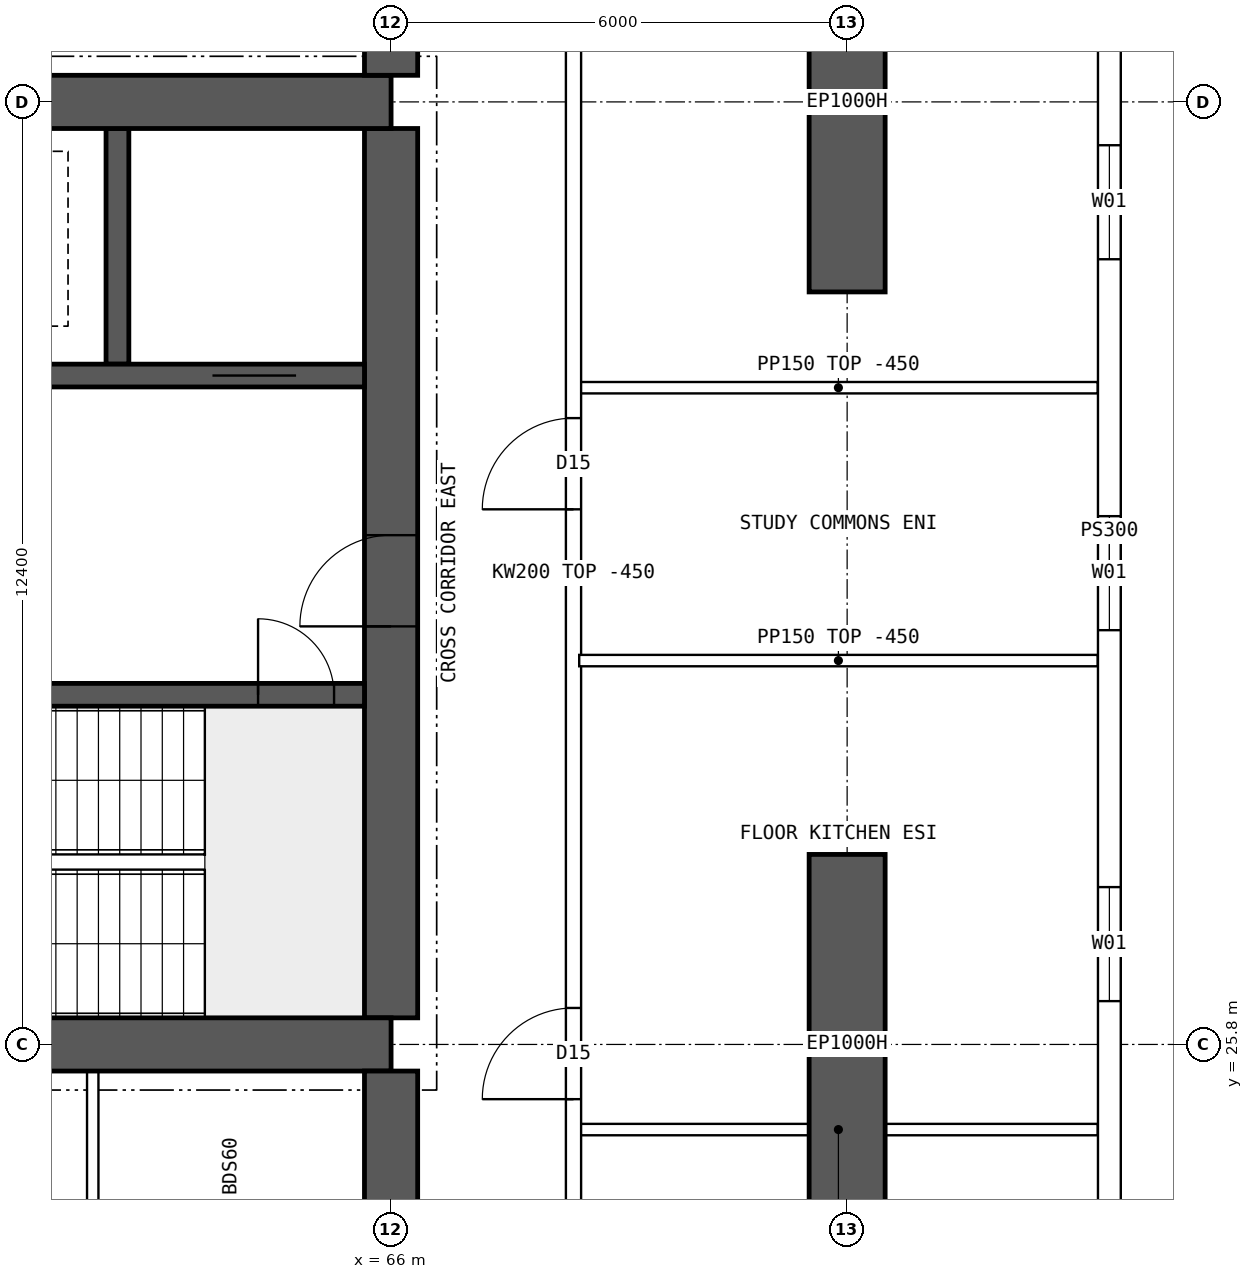
"""IFC4 building model, lengths in metres.
Left out: names, types, materials, properties, quantities, classifications, styles, units other than length and angle.
Written with IfcOpenShell. Run it as: python <this file> out.ifc"""

import sys

from ifc_helpers import new_model, si_unit, direction, frame, frame_2d, origin, place, context, subcontext, project, spatial, polyline, rectangle, outline, extrude, element, fill, save


model = new_model("IFC4")
c1 = context("Model", 3, precision=1e-05, world=origin(), true_north=direction((0.0, 1.0)))
c2 = subcontext(c1, "Body", "Model", "MODEL_VIEW")
j1 = project(units=[si_unit("LENGTHUNIT", "METRE"), si_unit("PLANEANGLEUNIT", "RADIAN")], contexts=[c1])
p1 = place(None, origin())
s1 = spatial("IfcSite", under=j1, at=p1, CompositionType="ELEMENT")
p2 = place(p1, origin())
s2 = spatial("IfcBuilding", under=s1, at=p2, CompositionType="ELEMENT")
p3 = place(p2, frame((0.0, 0.0, 227.8)))
s3 = spatial("IfcBuildingStorey", under=s2, at=p3, CompositionType="ELEMENT", Elevation=227.8)
for number, where, z_axis, x_axis in (
    (1, (72.0, 23.3, 0.0), (0.0, 0.0, 1.0), (0.0, 1.0, 0.0)),
    (2, (72.0, 35.7, 0.0), (0.0, 0.0, 1.0), (0.0, 1.0, 0.0)),
):
    element("IfcWall", number, at=place(p3, frame(where, z_axis=z_axis, x_axis=x_axis)), inside=s3, PredefinedType="SHEAR", context=c2, shape_type="SweptSolid", body=[
        extrude(rectangle(XDim=5.0, YDim=1.0, at=frame_2d((2.5, 0.0))), origin(), (0.0, 0.0, 1.0), 3.75),
    ])
for number, where, z_axis, x_axis in (
    (3, (18.0, 25.8, 0.0), (0.0, 0.0, 1.0), (1.0, 0.0, 0.0)),
    (4, (18.0, 38.2, 0.0), (0.0, 0.0, 1.0), (1.0, 0.0, 0.0)),
):
    element("IfcWall", number, at=place(p3, frame(where, z_axis=z_axis, x_axis=x_axis)), inside=s3, PredefinedType="SHEAR", context=c2, shape_type="SweptSolid", body=[
        extrude(rectangle(XDim=48.0, YDim=0.7, at=frame_2d((24.0, 0.0))), origin(), (0.0, 0.0, 1.0), 3.75),
    ])
p4 = place(p3, frame((66.0, 26.15, 0.0), z_axis=(0.0, 0.0, 1.0), x_axis=(0.0, 1.0, 0.0)))
e5 = element("IfcWall", 5, at=p4, inside=s3, PredefinedType="SHEAR", context=c2, shape_type="SweptSolid", body=[
    extrude(rectangle(XDim=11.7, YDim=0.7, at=frame_2d((5.85, 0.0))), origin(), (0.0, 0.0, 1.0), 3.75),
])
p5 = place(p4, frame((5.15, 0.0, 0.0)))
e6 = element("IfcOpeningElement", 6, at=p5, cuts=e5, PredefinedType="OPENING", context=c2, shape_type="SweptSolid", body=[
    extrude(rectangle(XDim=1.2, YDim=2.1, at=frame_2d((0.6, 1.05))), frame((0.0, 0.36, 0.0), z_axis=(0.0, -1.0, 0.0), x_axis=(1.0, 0.0, 0.0)), (0.0, 0.0, 1.0), 0.72),
])
p6 = place(p3, frame((18.35, 30.4, 0.0), z_axis=(0.0, 0.0, 1.0), x_axis=(1.0, 0.0, 0.0)))
e7 = element("IfcWall", 7, at=p6, inside=s3, PredefinedType="SHEAR", context=c2, shape_type="SweptSolid", body=[
    extrude(rectangle(XDim=47.3, YDim=0.3, at=frame_2d((23.65, 0.0))), origin(), (0.0, 0.0, 1.0), 3.75),
])
p7 = place(p6, frame((0.4, 0.0, 0.0)))
e8 = element("IfcOpeningElement", 8, at=p7, cuts=e7, PredefinedType="OPENING", context=c2, shape_type="SweptSolid", body=[
    extrude(rectangle(XDim=1.0, YDim=2.1, at=frame_2d((0.5, 1.05))), frame((0.0, 0.16, 0.0), z_axis=(0.0, -1.0, 0.0), x_axis=(1.0, 0.0, 0.0)), (0.0, 0.0, 1.0), 0.32),
])
p8 = place(p6, frame((45.9, 0.0, 0.0)))
e9 = element("IfcOpeningElement", 9, at=p8, cuts=e7, PredefinedType="OPENING", context=c2, shape_type="SweptSolid", body=[
    extrude(rectangle(XDim=1.0, YDim=2.1, at=frame_2d((0.5, 1.05))), frame((0.0, 0.16, 0.0), z_axis=(0.0, -1.0, 0.0), x_axis=(1.0, 0.0, 0.0)), (0.0, 0.0, 1.0), 0.32),
])
p9 = place(p6, frame((8.4, 0.0, 0.0)))
e10 = element("IfcOpeningElement", 10, at=p9, cuts=e7, PredefinedType="OPENING", context=c2, shape_type="SweptSolid", body=[
    extrude(rectangle(XDim=1.1, YDim=2.1, at=frame_2d((0.55, 1.05))), frame((0.0, 0.16, 0.0), z_axis=(0.0, -1.0, 0.0), x_axis=(1.0, 0.0, 0.0)), (0.0, 0.0, 1.0), 0.32),
])
p10 = place(p6, frame((11.0, 0.0, 0.0)))
e11 = element("IfcOpeningElement", 11, at=p10, cuts=e7, PredefinedType="OPENING", context=c2, shape_type="SweptSolid", body=[
    extrude(rectangle(XDim=1.1, YDim=2.1, at=frame_2d((0.55, 1.05))), frame((0.0, 0.16, 0.0), z_axis=(0.0, -1.0, 0.0), x_axis=(1.0, 0.0, 0.0)), (0.0, 0.0, 1.0), 0.32),
])
p11 = place(p6, frame((13.6, 0.0, 0.0)))
e12 = element("IfcOpeningElement", 12, at=p11, cuts=e7, PredefinedType="OPENING", context=c2, shape_type="SweptSolid", body=[
    extrude(rectangle(XDim=1.1, YDim=2.1, at=frame_2d((0.55, 1.05))), frame((0.0, 0.16, 0.0), z_axis=(0.0, -1.0, 0.0), x_axis=(1.0, 0.0, 0.0)), (0.0, 0.0, 1.0), 0.32),
])
p12 = place(p6, frame((16.2, 0.0, 0.0)))
e13 = element("IfcOpeningElement", 13, at=p12, cuts=e7, PredefinedType="OPENING", context=c2, shape_type="SweptSolid", body=[
    extrude(rectangle(XDim=1.1, YDim=2.1, at=frame_2d((0.55, 1.05))), frame((0.0, 0.16, 0.0), z_axis=(0.0, -1.0, 0.0), x_axis=(1.0, 0.0, 0.0)), (0.0, 0.0, 1.0), 0.32),
])
p13 = place(p6, frame((18.975, 0.0, 0.0)))
e14 = element("IfcOpeningElement", 14, at=p13, cuts=e7, PredefinedType="OPENING", context=c2, shape_type="SweptSolid", body=[
    extrude(rectangle(XDim=0.9, YDim=2.1, at=frame_2d((0.45, 1.05))), frame((0.0, 0.16, 0.0), z_axis=(0.0, -1.0, 0.0), x_axis=(1.0, 0.0, 0.0)), (0.0, 0.0, 1.0), 0.32),
])
p14 = place(p6, frame((24.475, 0.0, 0.0)))
e15 = element("IfcOpeningElement", 15, at=p14, cuts=e7, PredefinedType="OPENING", context=c2, shape_type="SweptSolid", body=[
    extrude(rectangle(XDim=0.9, YDim=2.1, at=frame_2d((0.45, 1.05))), frame((0.0, 0.16, 0.0), z_axis=(0.0, -1.0, 0.0), x_axis=(1.0, 0.0, 0.0)), (0.0, 0.0, 1.0), 0.32),
])
p15 = place(p6, frame((30.267, 0.0, 0.0)))
e16 = element("IfcOpeningElement", 16, at=p15, cuts=e7, PredefinedType="OPENING", context=c2, shape_type="SweptSolid", body=[
    extrude(rectangle(XDim=1.1, YDim=2.1, at=frame_2d((0.55, 1.05))), frame((0.0, 0.16, 0.0), z_axis=(0.0, -1.0, 0.0), x_axis=(1.0, 0.0, 0.0)), (0.0, 0.0, 1.0), 0.32),
])
p16 = place(p6, frame((33.8, 0.0, 0.0)))
e17 = element("IfcOpeningElement", 17, at=p16, cuts=e7, PredefinedType="OPENING", context=c2, shape_type="SweptSolid", body=[
    extrude(rectangle(XDim=1.1, YDim=2.1, at=frame_2d((0.55, 1.05))), frame((0.0, 0.16, 0.0), z_axis=(0.0, -1.0, 0.0), x_axis=(1.0, 0.0, 0.0)), (0.0, 0.0, 1.0), 0.32),
])
p17 = place(p6, frame((37.333, 0.0, 0.0)))
e18 = element("IfcOpeningElement", 18, at=p17, cuts=e7, PredefinedType="OPENING", context=c2, shape_type="SweptSolid", body=[
    extrude(rectangle(XDim=1.1, YDim=2.1, at=frame_2d((0.55, 1.05))), frame((0.0, 0.16, 0.0), z_axis=(0.0, -1.0, 0.0), x_axis=(1.0, 0.0, 0.0)), (0.0, 0.0, 1.0), 0.32),
])
p18 = place(p3, frame((18.35, 34.6, 0.0), z_axis=(0.0, 0.0, 1.0), x_axis=(1.0, 0.0, 0.0)))
e19 = element("IfcWall", 19, at=p18, inside=s3, PredefinedType="SHEAR", context=c2, shape_type="SweptSolid", body=[
    extrude(rectangle(XDim=47.3, YDim=0.3, at=frame_2d((23.65, 0.0))), origin(), (0.0, 0.0, 1.0), 3.75),
])
p19 = place(p18, frame((0.9, 0.0, 0.0)))
e20 = element("IfcOpeningElement", 20, at=p19, cuts=e19, PredefinedType="OPENING", context=c2, shape_type="SweptSolid", body=[
    extrude(rectangle(XDim=1.1, YDim=2.1, at=frame_2d((0.55, 1.05))), frame((0.0, 0.16, 0.0), z_axis=(0.0, -1.0, 0.0), x_axis=(1.0, 0.0, 0.0)), (0.0, 0.0, 1.0), 0.32),
])
p20 = place(p18, frame((45.3, 0.0, 0.0)))
e21 = element("IfcOpeningElement", 21, at=p20, cuts=e19, PredefinedType="OPENING", context=c2, shape_type="SweptSolid", body=[
    extrude(rectangle(XDim=1.1, YDim=2.1, at=frame_2d((0.55, 1.05))), frame((0.0, 0.16, 0.0), z_axis=(0.0, -1.0, 0.0), x_axis=(1.0, 0.0, 0.0)), (0.0, 0.0, 1.0), 0.32),
])
p21 = place(p18, frame((4.25, 0.0, 0.0)))
e22 = element("IfcOpeningElement", 22, at=p21, cuts=e19, PredefinedType="OPENING", context=c2, shape_type="SweptSolid", body=[
    extrude(rectangle(XDim=0.9, YDim=2.1, at=frame_2d((0.45, 1.05))), frame((0.0, 0.16, 0.0), z_axis=(0.0, -1.0, 0.0), x_axis=(1.0, 0.0, 0.0)), (0.0, 0.0, 1.0), 0.32),
])
p22 = place(p18, frame((42.15, 0.0, 0.0)))
e23 = element("IfcOpeningElement", 23, at=p22, cuts=e19, PredefinedType="OPENING", context=c2, shape_type="SweptSolid", body=[
    extrude(rectangle(XDim=0.9, YDim=2.1, at=frame_2d((0.45, 1.05))), frame((0.0, 0.16, 0.0), z_axis=(0.0, -1.0, 0.0), x_axis=(1.0, 0.0, 0.0)), (0.0, 0.0, 1.0), 0.32),
])
p23 = place(p18, frame((9.025, 0.0, 0.0)))
e24 = element("IfcOpeningElement", 24, at=p23, cuts=e19, PredefinedType="OPENING", context=c2, shape_type="SweptSolid", body=[
    extrude(rectangle(XDim=0.9, YDim=2.1, at=frame_2d((0.45, 1.05))), frame((0.0, 0.16, 0.0), z_axis=(0.0, -1.0, 0.0), x_axis=(1.0, 0.0, 0.0)), (0.0, 0.0, 1.0), 0.32),
])
p24 = place(p18, frame((12.999, 0.0, 0.0)))
e25 = element("IfcOpeningElement", 25, at=p24, cuts=e19, PredefinedType="OPENING", context=c2, shape_type="SweptSolid", body=[
    extrude(rectangle(XDim=0.9, YDim=2.1, at=frame_2d((0.45, 1.05))), frame((0.0, 0.16, 0.0), z_axis=(0.0, -1.0, 0.0), x_axis=(1.0, 0.0, 0.0)), (0.0, 0.0, 1.0), 0.32),
])
p25 = place(p18, frame((16.646, 0.0, 0.0)))
e26 = element("IfcOpeningElement", 26, at=p25, cuts=e19, PredefinedType="OPENING", context=c2, shape_type="SweptSolid", body=[
    extrude(rectangle(XDim=0.9, YDim=2.1, at=frame_2d((0.45, 1.05))), frame((0.0, 0.16, 0.0), z_axis=(0.0, -1.0, 0.0), x_axis=(1.0, 0.0, 0.0)), (0.0, 0.0, 1.0), 0.32),
])
p26 = place(p18, frame((20.405, 0.0, 0.0)))
e27 = element("IfcOpeningElement", 27, at=p26, cuts=e19, PredefinedType="OPENING", context=c2, shape_type="SweptSolid", body=[
    extrude(rectangle(XDim=0.9, YDim=2.1, at=frame_2d((0.45, 1.05))), frame((0.0, 0.16, 0.0), z_axis=(0.0, -1.0, 0.0), x_axis=(1.0, 0.0, 0.0)), (0.0, 0.0, 1.0), 0.32),
])
p27 = place(p18, frame((24.811, 0.0, 0.0)))
e28 = element("IfcOpeningElement", 28, at=p27, cuts=e19, PredefinedType="OPENING", context=c2, shape_type="SweptSolid", body=[
    extrude(rectangle(XDim=0.9, YDim=2.1, at=frame_2d((0.45, 1.05))), frame((0.0, 0.16, 0.0), z_axis=(0.0, -1.0, 0.0), x_axis=(1.0, 0.0, 0.0)), (0.0, 0.0, 1.0), 0.32),
])
p28 = place(p18, frame((27.608, 0.0, 0.0)))
e29 = element("IfcOpeningElement", 29, at=p28, cuts=e19, PredefinedType="OPENING", context=c2, shape_type="SweptSolid", body=[
    extrude(rectangle(XDim=0.9, YDim=2.1, at=frame_2d((0.45, 1.05))), frame((0.0, 0.16, 0.0), z_axis=(0.0, -1.0, 0.0), x_axis=(1.0, 0.0, 0.0)), (0.0, 0.0, 1.0), 0.32),
])
p29 = place(p18, frame((33.729, 0.0, 0.0)))
e30 = element("IfcOpeningElement", 30, at=p29, cuts=e19, PredefinedType="OPENING", context=c2, shape_type="SweptSolid", body=[
    extrude(rectangle(XDim=0.9, YDim=2.1, at=frame_2d((0.45, 1.05))), frame((0.0, 0.16, 0.0), z_axis=(0.0, -1.0, 0.0), x_axis=(1.0, 0.0, 0.0)), (0.0, 0.0, 1.0), 0.32),
])
p30 = place(p3, frame((62.4, 34.75, 0.0), z_axis=(0.0, 0.0, 1.0), x_axis=(0.0, 1.0, 0.0)))
e31 = element("IfcWall", 31, at=p30, inside=s3, PredefinedType="SHEAR", context=c2, shape_type="SweptSolid", body=[
    extrude(rectangle(XDim=3.1, YDim=0.3, at=frame_2d((1.55, 0.0))), origin(), (0.0, 0.0, 1.0), 3.75),
])
for number, where, z_axis, x_axis in (
    (32, (66.0, 18.4, 0.0), (0.0, 0.0, 1.0), (0.0, 1.0, 0.0)),
    (33, (66.0, 38.55, 0.0), (0.0, 0.0, 1.0), (0.0, 1.0, 0.0)),
):
    element("IfcWall", number, at=place(p3, frame(where, z_axis=z_axis, x_axis=x_axis)), inside=s3, PredefinedType="SHEAR", context=c2, shape_type="SweptSolid", body=[
        extrude(rectangle(XDim=7.05, YDim=0.7, at=frame_2d((3.525, 0.0))), origin(), (0.0, 0.0, 1.0), 3.75),
    ])
p31 = place(p3, frame((75.45, 19.8, 0.0), z_axis=(0.0, 0.0, 1.0), x_axis=(0.0, 1.0, 0.0)))
e34 = element("IfcWall", 34, at=p31, inside=s3, PredefinedType="SOLIDWALL", context=c2, shape_type="SweptSolid", body=[
    extrude(outline(polyline([(-0.015, -0.15), (24.415, -0.15), (24.385, 0.15), (0.015, 0.15), (-0.015, -0.15)])), origin(), (0.0, 0.0, 1.0), 3.3),
])
p32 = place(p31, frame((1.69, 0.0, 0.9)))
e35 = element("IfcOpeningElement", 35, at=p32, cuts=e34, PredefinedType="OPENING", context=c2, shape_type="SweptSolid", body=[
    extrude(rectangle(XDim=1.5, YDim=2.0, at=frame_2d((0.75, 1.0))), frame((0.0, 0.16, 0.0), z_axis=(0.0, -1.0, 0.0), x_axis=(1.0, 0.0, 0.0)), (0.0, 0.0, 1.0), 0.32),
])
p33 = place(p31, frame((6.57, 0.0, 0.9)))
e36 = element("IfcOpeningElement", 36, at=p33, cuts=e34, PredefinedType="OPENING", context=c2, shape_type="SweptSolid", body=[
    extrude(rectangle(XDim=1.5, YDim=2.0, at=frame_2d((0.75, 1.0))), frame((0.0, 0.16, 0.0), z_axis=(0.0, -1.0, 0.0), x_axis=(1.0, 0.0, 0.0)), (0.0, 0.0, 1.0), 0.32),
])
p34 = place(p31, frame((11.45, 0.0, 0.9)))
e37 = element("IfcOpeningElement", 37, at=p34, cuts=e34, PredefinedType="OPENING", context=c2, shape_type="SweptSolid", body=[
    extrude(rectangle(XDim=1.5, YDim=2.0, at=frame_2d((0.75, 1.0))), frame((0.0, 0.16, 0.0), z_axis=(0.0, -1.0, 0.0), x_axis=(1.0, 0.0, 0.0)), (0.0, 0.0, 1.0), 0.32),
])
p35 = place(p31, frame((16.33, 0.0, 0.9)))
e38 = element("IfcOpeningElement", 38, at=p35, cuts=e34, PredefinedType="OPENING", context=c2, shape_type="SweptSolid", body=[
    extrude(rectangle(XDim=1.5, YDim=2.0, at=frame_2d((0.75, 1.0))), frame((0.0, 0.16, 0.0), z_axis=(0.0, -1.0, 0.0), x_axis=(1.0, 0.0, 0.0)), (0.0, 0.0, 1.0), 0.32),
])
p36 = place(p31, frame((21.21, 0.0, 0.9)))
e39 = element("IfcOpeningElement", 39, at=p36, cuts=e34, PredefinedType="OPENING", context=c2, shape_type="SweptSolid", body=[
    extrude(rectangle(XDim=1.5, YDim=2.0, at=frame_2d((0.75, 1.0))), frame((0.0, 0.16, 0.0), z_axis=(0.0, -1.0, 0.0), x_axis=(1.0, 0.0, 0.0)), (0.0, 0.0, 1.0), 0.32),
])
p37 = place(p3, frame((62.075, 18.5, 0.0), z_axis=(0.0, 0.0, 1.0), x_axis=(0.0, 1.0, 0.0)))
e40 = element("IfcWall", 40, at=p37, inside=s3, PredefinedType="PARTITIONING", context=c2, shape_type="SweptSolid", body=[
    extrude(rectangle(XDim=6.95, YDim=0.15, at=frame_2d((3.475, 0.0))), origin(), (0.0, 0.0, 1.0), 3.3),
])
p38 = place(p3, frame((68.475, 30.85, 0.0), z_axis=(0.0, 0.0, 1.0), x_axis=(1.0, 0.0, 0.0)))
e41 = element("IfcWall", 41, at=p38, inside=s3, PredefinedType="PARTITIONING", context=c2, shape_type="SweptSolid", body=[
    extrude(outline(polyline([(0.0, 0.0), (6.82, 0.0), (6.82, 3.3), (3.827, 3.3), (3.825, 2.85), (3.227, 2.85), (3.225, 3.3), (0.0, 3.3), (0.0, 0.0)])), frame((0.0, 0.075, 0.0), z_axis=(0.0, -1.0, 0.0), x_axis=(1.0, 0.0, 0.0)), (0.0, 0.0, 1.0), 0.15),
])
p39 = place(p3, frame((68.4, 11.646, 0.0), z_axis=(0.0, 0.0, 1.0), x_axis=(0.0, 1.0, 0.0)))
e42 = element("IfcWall", 42, at=p39, inside=s3, PredefinedType="SOLIDWALL", context=c2, shape_type="SweptSolid", body=[
    extrude(rectangle(XDim=40.708, YDim=0.2, at=frame_2d((20.354, 0.0))), origin(), (0.0, 0.0, 1.0), 3.3),
])
p40 = place(p39, frame((13.434, 0.0, 0.0)))
e43 = element("IfcOpeningElement", 43, at=p40, cuts=e42, PredefinedType="OPENING", context=c2, shape_type="SweptSolid", body=[
    extrude(rectangle(XDim=1.2, YDim=2.1, at=frame_2d((0.6, 1.05))), frame((0.0, 0.11, 0.0), z_axis=(0.0, -1.0, 0.0), x_axis=(1.0, 0.0, 0.0)), (0.0, 0.0, 1.0), 0.22),
])
p41 = place(p39, frame((21.194, 0.0, 0.0)))
e44 = element("IfcOpeningElement", 44, at=p41, cuts=e42, PredefinedType="OPENING", context=c2, shape_type="SweptSolid", body=[
    extrude(rectangle(XDim=1.2, YDim=2.1, at=frame_2d((0.6, 1.05))), frame((0.0, 0.11, 0.0), z_axis=(0.0, -1.0, 0.0), x_axis=(1.0, 0.0, 0.0)), (0.0, 0.0, 1.0), 0.22),
])
p42 = place(p39, frame((5.104, 0.0, 0.0)))
e45 = element("IfcOpeningElement", 45, at=p42, cuts=e42, PredefinedType="OPENING", context=c2, shape_type="SweptSolid", body=[
    extrude(rectangle(XDim=1.4, YDim=2.1, at=frame_2d((0.7, 1.05))), frame((0.0, 0.11, 0.0), z_axis=(0.0, -1.0, 0.0), x_axis=(1.0, 0.0, 0.0)), (0.0, 0.0, 1.0), 0.22),
])
p43 = place(p39, frame((34.104, 0.0, 0.0)))
e46 = element("IfcOpeningElement", 46, at=p43, cuts=e42, PredefinedType="OPENING", context=c2, shape_type="SweptSolid", body=[
    extrude(rectangle(XDim=1.4, YDim=2.1, at=frame_2d((0.7, 1.05))), frame((0.0, 0.11, 0.0), z_axis=(0.0, -1.0, 0.0), x_axis=(1.0, 0.0, 0.0)), (0.0, 0.0, 1.0), 0.22),
])
p44 = place(p3, frame((68.475, 24.68, 0.0), z_axis=(0.0, 0.0, 1.0), x_axis=(1.0, 0.0, 0.0)))
e47 = element("IfcWall", 47, at=p44, inside=s3, PredefinedType="PARTITIONING", context=c2, shape_type="SweptSolid", body=[
    extrude(rectangle(XDim=6.82, YDim=0.15, at=frame_2d((3.41, 0.0))), origin(), (0.0, 0.0, 1.0), 3.3),
])
p45 = place(p3, frame((68.475, 34.44, 0.0), z_axis=(0.0, 0.0, 1.0), x_axis=(1.0, 0.0, 0.0)))
e48 = element("IfcWall", 48, at=p45, inside=s3, PredefinedType="PARTITIONING", context=c2, shape_type="SweptSolid", body=[
    extrude(outline(polyline([(0.0, 0.0), (6.82, 0.0), (6.82, 3.3), (3.827, 3.3), (3.825, 2.85), (3.227, 2.85), (3.225, 3.3), (0.0, 3.3), (0.0, 0.0)])), frame((0.0, 0.075, 0.0), z_axis=(0.0, -1.0, 0.0), x_axis=(1.0, 0.0, 0.0)), (0.0, 0.0, 1.0), 0.15),
])
p46 = place(p33, origin())
e49 = element("IfcWindow", 49, at=p46, inside=s3, PartitioningType="SINGLE_PANEL", PredefinedType="WINDOW", context=c2, shape_type="SweptSolid", body=[
    extrude(rectangle(XDim=1.5, YDim=2.0, at=frame_2d((0.75, 1.0))), frame((0.0, 0.03, 0.0), z_axis=(0.0, -1.0, 0.0), x_axis=(1.0, 0.0, 0.0)), (0.0, 0.0, 1.0), 0.06),
])
fill(e36, e49)
p47 = place(p34, origin())
e50 = element("IfcWindow", 50, at=p47, inside=s3, PartitioningType="SINGLE_PANEL", PredefinedType="WINDOW", context=c2, shape_type="SweptSolid", body=[
    extrude(rectangle(XDim=1.5, YDim=2.0, at=frame_2d((0.75, 1.0))), frame((0.0, 0.03, 0.0), z_axis=(0.0, -1.0, 0.0), x_axis=(1.0, 0.0, 0.0)), (0.0, 0.0, 1.0), 0.06),
])
fill(e37, e50)
p48 = place(p35, origin())
e51 = element("IfcWindow", 51, at=p48, inside=s3, PartitioningType="SINGLE_PANEL", PredefinedType="WINDOW", context=c2, shape_type="SweptSolid", body=[
    extrude(rectangle(XDim=1.5, YDim=2.0, at=frame_2d((0.75, 1.0))), frame((0.0, 0.03, 0.0), z_axis=(0.0, -1.0, 0.0), x_axis=(1.0, 0.0, 0.0)), (0.0, 0.0, 1.0), 0.06),
])
fill(e38, e51)
p49 = place(p5, origin())
e52 = element("IfcDoor", 52, at=p49, inside=s3, OperationType="SINGLE_SWING_LEFT", PredefinedType="DOOR", context=c2, shape_type="SweptSolid", body=[
    extrude(rectangle(XDim=1.2, YDim=2.1, at=frame_2d((0.6, 1.05))), frame((0.0, 0.025, 0.0), z_axis=(0.0, -1.0, 0.0), x_axis=(1.0, 0.0, 0.0)), (0.0, 0.0, 1.0), 0.05),
])
fill(e6, e52)
p50 = place(p8, origin())
e53 = element("IfcDoor", 53, at=p50, inside=s3, OperationType="SINGLE_SWING_LEFT", PredefinedType="DOOR", context=c2, shape_type="SweptSolid", body=[
    extrude(rectangle(XDim=1.0, YDim=2.1, at=frame_2d((0.5, 1.05))), frame((0.0, 0.025, 0.0), z_axis=(0.0, -1.0, 0.0), x_axis=(1.0, 0.0, 0.0)), (0.0, 0.0, 1.0), 0.05),
])
fill(e9, e53)
p51 = place(p20, origin())
e54 = element("IfcDoor", 54, at=p51, inside=s3, OperationType="DOUBLE_DOOR_SLIDING", PredefinedType="DOOR", context=c2, shape_type="SweptSolid", body=[
    extrude(rectangle(XDim=1.1, YDim=2.1, at=frame_2d((0.55, 1.05))), frame((0.0, 0.025, 0.0), z_axis=(0.0, -1.0, 0.0), x_axis=(1.0, 0.0, 0.0)), (0.0, 0.0, 1.0), 0.05),
])
fill(e21, e54)
p52 = place(p40, origin())
e55 = element("IfcDoor", 55, at=p52, inside=s3, OperationType="SINGLE_SWING_LEFT", PredefinedType="DOOR", context=c2, shape_type="SweptSolid", body=[
    extrude(rectangle(XDim=1.2, YDim=2.1, at=frame_2d((0.6, 1.05))), frame((0.0, 0.025, 0.0), z_axis=(0.0, -1.0, 0.0), x_axis=(1.0, 0.0, 0.0)), (0.0, 0.0, 1.0), 0.05),
])
fill(e43, e55)
p53 = place(p41, origin())
e56 = element("IfcDoor", 56, at=p53, inside=s3, OperationType="SINGLE_SWING_LEFT", PredefinedType="DOOR", context=c2, shape_type="SweptSolid", body=[
    extrude(rectangle(XDim=1.2, YDim=2.1, at=frame_2d((0.6, 1.05))), frame((0.0, 0.025, 0.0), z_axis=(0.0, -1.0, 0.0), x_axis=(1.0, 0.0, 0.0)), (0.0, 0.0, 1.0), 0.05),
])
fill(e44, e56)
save(model, sys.argv[1])
